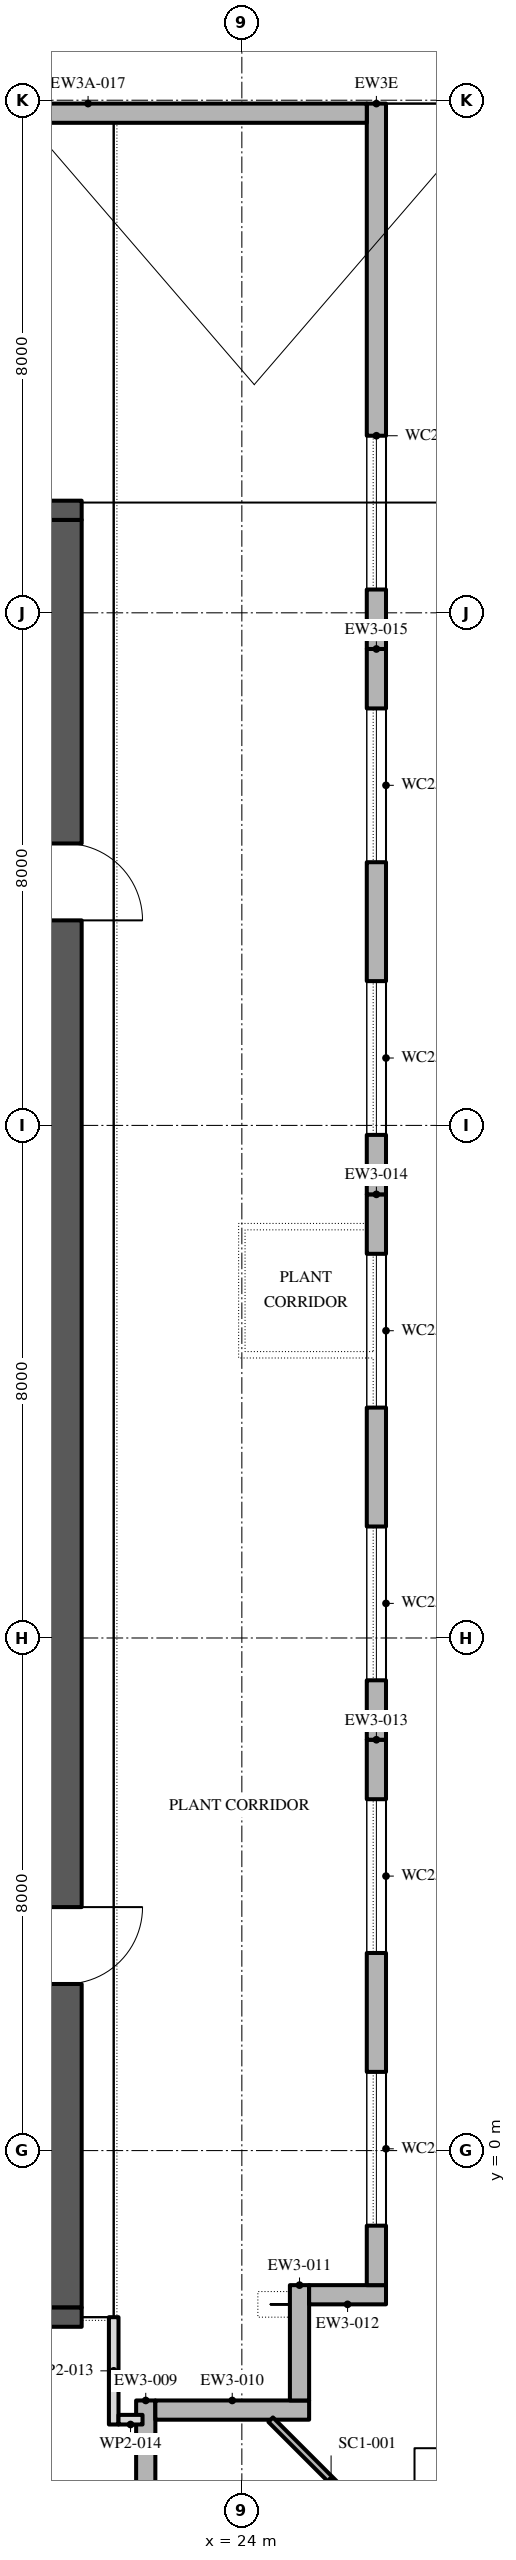
"""IFC4 building model, lengths in metres.
Left out: names, types, materials, properties, quantities, classifications, styles, units other than length and angle.
Written with IfcOpenShell. Run it as: python <this file> out.ifc"""

import sys

from ifc_helpers import new_model, si_unit, direction, frame, frame_2d, origin, place, context, subcontext, project, spatial, polyline, rectangle, outline, extrude, element, fill, save


model = new_model("IFC4")
c1 = context("Model", 3, precision=1e-05, world=origin(), true_north=direction((0.0, 1.0)))
c2 = subcontext(c1, "Body", "Model", "MODEL_VIEW")
j1 = project(units=[si_unit("LENGTHUNIT", "METRE"), si_unit("PLANEANGLEUNIT", "RADIAN")], contexts=[c1])
p1 = place(None, origin())
s1 = spatial("IfcSite", under=j1, at=p1, CompositionType="ELEMENT")
p2 = place(p1, origin())
s2 = spatial("IfcBuilding", under=s1, at=p2, CompositionType="ELEMENT")
p3 = place(p2, frame((0.0, 0.0, 385.8)))
s3 = spatial("IfcBuildingStorey", under=s2, at=p3, CompositionType="ELEMENT", Elevation=385.8)
p4 = place(p3, frame((22.5, -5.7, 0.0), z_axis=(0.0, 0.0, 1.0), x_axis=(0.0, 1.0, 0.0)))
e1 = element("IfcWall", 1, at=p4, inside=s3, PredefinedType="STANDARD", context=c2, shape_type="SweptSolid", body=[
    extrude(rectangle(XDim=1.8, YDim=0.3, at=frame_2d((0.9, 0.0))), origin(), (0.0, 0.0, 1.0), 4.0),
])
p5 = place(p3, frame((22.65, -4.05, 0.0), z_axis=(0.0, 0.0, 1.0), x_axis=(1.0, 0.0, 0.0)))
e2 = element("IfcWall", 2, at=p5, inside=s3, PredefinedType="STANDARD", context=c2, shape_type="SweptSolid", body=[
    extrude(rectangle(XDim=2.4, YDim=0.3, at=frame_2d((1.2, 0.0))), origin(), (0.0, 0.0, 1.0), 4.0),
])
p6 = place(p3, frame((24.9, -3.9, 0.0), z_axis=(0.0, 0.0, 1.0), x_axis=(0.0, 1.0, 0.0)))
e3 = element("IfcWall", 3, at=p6, inside=s3, PredefinedType="STANDARD", context=c2, shape_type="SweptSolid", body=[
    extrude(rectangle(XDim=1.8, YDim=0.3, at=frame_2d((0.9, 0.0))), origin(), (0.0, 0.0, 1.0), 4.0),
])
p7 = place(p3, frame((25.05, -2.25, 0.0), z_axis=(0.0, 0.0, 1.0), x_axis=(1.0, 0.0, 0.0)))
e4 = element("IfcWall", 4, at=p7, inside=s3, PredefinedType="STANDARD", context=c2, shape_type="SweptSolid", body=[
    extrude(rectangle(XDim=1.2, YDim=0.3, at=frame_2d((0.6, 0.0))), origin(), (0.0, 0.0, 1.0), 4.0),
])
p8 = place(p3, frame((26.1, -2.1, 0.0), z_axis=(0.0, 0.0, 1.0), x_axis=(0.0, 1.0, 0.0)))
e5 = element("IfcWall", 5, at=p8, inside=s3, PredefinedType="STANDARD", context=c2, shape_type="SweptSolid", body=[
    extrude(rectangle(XDim=8.512, YDim=0.3, at=frame_2d((4.256, 0.0))), origin(), (0.0, 0.0, 1.0), 4.0),
])
p9 = place(p8, frame((0.928, 0.0, 0.8)))
e6 = element("IfcOpeningElement", 6, at=p9, cuts=e5, PredefinedType="OPENING", context=c2, shape_type="SweptSolid", body=[
    extrude(outline(polyline([(0.0, 0.0), (2.4, 0.0), (2.4, 1.25), (2.377, 1.488), (2.31, 1.717), (2.2, 1.929), (2.051, 2.116), (1.87, 2.272), (1.663, 2.391), (1.437, 2.468), (1.2, 2.5), (0.963, 2.468), (0.737, 2.391), (0.53, 2.272), (0.349, 2.116), (0.2, 1.929), (0.09, 1.717), (0.023, 1.488), (0.0, 1.25), (0.0, 0.0)])), frame((0.0, 0.16, 0.0), z_axis=(0.0, -1.0, 0.0), x_axis=(1.0, 0.0, 0.0)), (0.0, 0.0, 1.0), 0.32),
])
p10 = place(p8, frame((5.184, 0.0, 0.8)))
e7 = element("IfcOpeningElement", 7, at=p10, cuts=e5, PredefinedType="OPENING", context=c2, shape_type="SweptSolid", body=[
    extrude(outline(polyline([(0.0, 0.0), (2.4, 0.0), (2.4, 1.25), (2.377, 1.488), (2.31, 1.717), (2.2, 1.929), (2.051, 2.116), (1.87, 2.272), (1.663, 2.391), (1.437, 2.468), (1.2, 2.5), (0.963, 2.468), (0.737, 2.391), (0.53, 2.272), (0.349, 2.116), (0.2, 1.929), (0.09, 1.717), (0.023, 1.488), (0.0, 1.25), (0.0, 0.0)])), frame((0.0, 0.16, 0.0), z_axis=(0.0, -1.0, 0.0), x_axis=(1.0, 0.0, 0.0)), (0.0, 0.0, 1.0), 0.32),
])
p11 = place(p3, frame((26.1, 6.412, 0.0), z_axis=(0.0, 0.0, 1.0), x_axis=(0.0, 1.0, 0.0)))
e8 = element("IfcWall", 8, at=p11, inside=s3, PredefinedType="STANDARD", context=c2, shape_type="SweptSolid", body=[
    extrude(rectangle(XDim=8.512, YDim=0.3, at=frame_2d((4.256, 0.0))), origin(), (0.0, 0.0, 1.0), 4.0),
])
p12 = place(p11, frame((0.928, 0.0, 0.8)))
e9 = element("IfcOpeningElement", 9, at=p12, cuts=e8, PredefinedType="OPENING", context=c2, shape_type="SweptSolid", body=[
    extrude(outline(polyline([(0.0, 0.0), (2.4, 0.0), (2.4, 1.25), (2.377, 1.488), (2.31, 1.717), (2.2, 1.929), (2.051, 2.116), (1.87, 2.272), (1.663, 2.391), (1.437, 2.468), (1.2, 2.5), (0.963, 2.468), (0.737, 2.391), (0.53, 2.272), (0.349, 2.116), (0.2, 1.929), (0.09, 1.717), (0.023, 1.488), (0.0, 1.25), (0.0, 0.0)])), frame((0.0, 0.16, 0.0), z_axis=(0.0, -1.0, 0.0), x_axis=(1.0, 0.0, 0.0)), (0.0, 0.0, 1.0), 0.32),
])
p13 = place(p11, frame((5.184, 0.0, 0.8)))
e10 = element("IfcOpeningElement", 10, at=p13, cuts=e8, PredefinedType="OPENING", context=c2, shape_type="SweptSolid", body=[
    extrude(outline(polyline([(0.0, 0.0), (2.4, 0.0), (2.4, 1.25), (2.377, 1.488), (2.31, 1.717), (2.2, 1.929), (2.051, 2.116), (1.87, 2.272), (1.663, 2.391), (1.437, 2.468), (1.2, 2.5), (0.963, 2.468), (0.737, 2.391), (0.53, 2.272), (0.349, 2.116), (0.2, 1.929), (0.09, 1.717), (0.023, 1.488), (0.0, 1.25), (0.0, 0.0)])), frame((0.0, 0.16, 0.0), z_axis=(0.0, -1.0, 0.0), x_axis=(1.0, 0.0, 0.0)), (0.0, 0.0, 1.0), 0.32),
])
p14 = place(p3, frame((26.1, 14.924, 0.0), z_axis=(0.0, 0.0, 1.0), x_axis=(0.0, 1.0, 0.0)))
e11 = element("IfcWall", 11, at=p14, inside=s3, PredefinedType="STANDARD", context=c2, shape_type="SweptSolid", body=[
    extrude(rectangle(XDim=8.512, YDim=0.3, at=frame_2d((4.256, 0.0))), origin(), (0.0, 0.0, 1.0), 4.0),
])
p15 = place(p14, frame((0.928, 0.0, 0.8)))
e12 = element("IfcOpeningElement", 12, at=p15, cuts=e11, PredefinedType="OPENING", context=c2, shape_type="SweptSolid", body=[
    extrude(outline(polyline([(0.0, 0.0), (2.4, 0.0), (2.4, 1.25), (2.377, 1.488), (2.31, 1.717), (2.2, 1.929), (2.051, 2.116), (1.87, 2.272), (1.663, 2.391), (1.437, 2.468), (1.2, 2.5), (0.963, 2.468), (0.737, 2.391), (0.53, 2.272), (0.349, 2.116), (0.2, 1.929), (0.09, 1.717), (0.023, 1.488), (0.0, 1.25), (0.0, 0.0)])), frame((0.0, 0.16, 0.0), z_axis=(0.0, -1.0, 0.0), x_axis=(1.0, 0.0, 0.0)), (0.0, 0.0, 1.0), 0.32),
])
p16 = place(p14, frame((5.184, 0.0, 0.8)))
e13 = element("IfcOpeningElement", 13, at=p16, cuts=e11, PredefinedType="OPENING", context=c2, shape_type="SweptSolid", body=[
    extrude(outline(polyline([(0.0, 0.0), (2.4, 0.0), (2.4, 1.25), (2.377, 1.488), (2.31, 1.717), (2.2, 1.929), (2.051, 2.116), (1.87, 2.272), (1.663, 2.391), (1.437, 2.468), (1.2, 2.5), (0.963, 2.468), (0.737, 2.391), (0.53, 2.272), (0.349, 2.116), (0.2, 1.929), (0.09, 1.717), (0.023, 1.488), (0.0, 1.25), (0.0, 0.0)])), frame((0.0, 0.16, 0.0), z_axis=(0.0, -1.0, 0.0), x_axis=(1.0, 0.0, 0.0)), (0.0, 0.0, 1.0), 0.32),
])
p17 = place(p3, frame((26.1, 23.436, 0.0), z_axis=(0.0, 0.0, 1.0), x_axis=(0.0, 1.0, 0.0)))
e14 = element("IfcWall", 14, at=p17, inside=s3, PredefinedType="STANDARD", context=c2, shape_type="SweptSolid", body=[
    extrude(outline(polyline([(0.0, 0.0), (8.512, 0.0), (8.512, 2.098), (5.693, 4.0), (2.305, 6.285), (2.285, 6.298), (2.285, 4.0), (0.0, 4.0), (0.0, 0.0)])), frame((0.0, 0.15, 0.0), z_axis=(0.0, -1.0, 0.0), x_axis=(1.0, 0.0, 0.0)), (0.0, 0.0, 1.0), 0.3),
])
p18 = place(p17, frame((0.928, 0.0, 0.8)))
e15 = element("IfcOpeningElement", 15, at=p18, cuts=e14, PredefinedType="OPENING", context=c2, shape_type="SweptSolid", body=[
    extrude(outline(polyline([(0.0, 0.0), (2.4, 0.0), (2.4, 0.85), (2.377, 1.088), (2.31, 1.317), (2.2, 1.529), (2.051, 1.717), (1.87, 1.872), (1.663, 1.991), (1.437, 2.068), (1.2, 2.1), (0.963, 2.068), (0.737, 1.991), (0.53, 1.872), (0.349, 1.717), (0.2, 1.529), (0.09, 1.317), (0.023, 1.088), (0.0, 0.85), (0.0, 0.0)])), frame((0.0, 0.16, 0.0), z_axis=(0.0, -1.0, 0.0), x_axis=(1.0, 0.0, 0.0)), (0.0, 0.0, 1.0), 0.32),
])
p19 = place(p3, frame((25.95, 31.798, 0.0), z_axis=(0.0, 0.0, 1.0), x_axis=(-1.0, 0.0, 0.0)))
e16 = element("IfcWall", 16, at=p19, inside=s3, PredefinedType="STANDARD", context=c2, shape_type="SweptSolid", body=[
    extrude(rectangle(XDim=8.7, YDim=0.3, at=frame_2d((4.35, 0.0))), origin(), (0.0, 0.0, 1.0), 2.199),
])
p20 = place(p3, frame((24.45, -4.2, -0.05), z_axis=(0.0, 0.0, 1.0), x_axis=(0.707106781187, -0.707106781187, 0.0)))
e17 = element("IfcWall", 17, at=p20, inside=s3, PredefinedType="STANDARD", context=c2, shape_type="SweptSolid", body=[
    extrude(rectangle(XDim=2.667, YDim=0.1, at=frame_2d((1.333, 0.0))), origin(), (0.0, 0.0, 1.0), 4.05),
])
p21 = place(p3, frame((21.25, -2.45, 0.0), z_axis=(0.0, 0.0, 1.0), x_axis=(0.0, 1.0, 0.0)))
e18 = element("IfcWall", 18, at=p21, inside=s3, PredefinedType="SHEAR", context=c2, shape_type="SweptSolid", body=[
    extrude(rectangle(XDim=27.9, YDim=0.5, at=frame_2d((13.95, 0.0))), origin(), (0.0, 0.0, 1.0), 4.0),
])
p22 = place(p21, frame((5.05, 0.0, 0.0)))
e19 = element("IfcOpeningElement", 19, at=p22, cuts=e18, PredefinedType="OPENING", context=c2, shape_type="SweptSolid", body=[
    extrude(rectangle(XDim=1.2, YDim=2.1, at=frame_2d((0.6, 1.05))), frame((0.0, 0.26, 0.0), z_axis=(0.0, -1.0, 0.0), x_axis=(1.0, 0.0, 0.0)), (0.0, 0.0, 1.0), 0.52),
])
p23 = place(p21, frame((21.65, 0.0, 0.0)))
e20 = element("IfcOpeningElement", 20, at=p23, cuts=e18, PredefinedType="OPENING", context=c2, shape_type="SweptSolid", body=[
    extrude(rectangle(XDim=1.2, YDim=2.1, at=frame_2d((0.6, 1.05))), frame((0.0, 0.26, 0.0), z_axis=(0.0, -1.0, 0.0), x_axis=(1.0, 0.0, 0.0)), (0.0, 0.0, 1.0), 0.52),
])
for number, where, z_axis, x_axis in (
    (21, (10.5, -2.6, 0.0), (0.0, 0.0, 1.0), (1.0, 0.0, 0.0)),
    (22, (10.5, 25.6, 0.0), (0.0, 0.0, 1.0), (1.0, 0.0, 0.0)),
):
    element("IfcWall", number, at=place(p3, frame(where, z_axis=z_axis, x_axis=x_axis)), inside=s3, PredefinedType="SHEAR", context=c2, shape_type="SweptSolid", body=[
        extrude(rectangle(XDim=11.0, YDim=0.3, at=frame_2d((5.5, 0.0))), origin(), (0.0, 0.0, 1.0), 4.0),
    ])
p24 = place(p3, frame((22.0, -4.275, 0.0), z_axis=(0.0, 0.0, 1.0), x_axis=(0.0, 1.0, 0.0)))
e23 = element("IfcWall", 23, at=p24, inside=s3, PredefinedType="PARTITIONING", context=c2, shape_type="SweptSolid", body=[
    extrude(rectangle(XDim=1.675, YDim=0.15, at=frame_2d((0.837, 0.0))), origin(), (0.0, 0.0, 1.0), 4.0),
])
p25 = place(p3, frame((22.45, -4.2, 0.0), z_axis=(0.0, 0.0, 1.0), x_axis=(-1.0, 0.0, 0.0)))
e24 = element("IfcWall", 24, at=p25, inside=s3, PredefinedType="PARTITIONING", context=c2, shape_type="SweptSolid", body=[
    extrude(rectangle(XDim=0.375, YDim=0.15, at=frame_2d((0.188, 0.0))), origin(), (0.0, 0.0, 1.0), 4.0),
])
p26 = place(p9, origin())
e25 = element("IfcWindow", 25, at=p26, inside=s3, PartitioningType="DOUBLE_PANEL_VERTICAL", PredefinedType="WINDOW", context=c2, shape_type="SweptSolid", body=[
    extrude(outline(polyline([(0.0, 0.0), (2.4, 0.0), (2.4, 1.25), (2.377, 1.488), (2.31, 1.717), (2.2, 1.929), (2.051, 2.116), (1.87, 2.272), (1.663, 2.391), (1.437, 2.468), (1.2, 2.5), (0.963, 2.468), (0.737, 2.391), (0.53, 2.272), (0.349, 2.116), (0.2, 1.929), (0.09, 1.717), (0.023, 1.488), (0.0, 1.25), (0.0, 0.0)])), frame((0.0, 0.03, 0.0), z_axis=(0.0, -1.0, 0.0), x_axis=(1.0, 0.0, 0.0)), (0.0, 0.0, 1.0), 0.06),
])
fill(e6, e25)
p27 = place(p10, origin())
e26 = element("IfcWindow", 26, at=p27, inside=s3, PartitioningType="DOUBLE_PANEL_VERTICAL", PredefinedType="WINDOW", context=c2, shape_type="SweptSolid", body=[
    extrude(outline(polyline([(0.0, 0.0), (2.4, 0.0), (2.4, 1.25), (2.377, 1.488), (2.31, 1.717), (2.2, 1.929), (2.051, 2.116), (1.87, 2.272), (1.663, 2.391), (1.437, 2.468), (1.2, 2.5), (0.963, 2.468), (0.737, 2.391), (0.53, 2.272), (0.349, 2.116), (0.2, 1.929), (0.09, 1.717), (0.023, 1.488), (0.0, 1.25), (0.0, 0.0)])), frame((0.0, 0.03, 0.0), z_axis=(0.0, -1.0, 0.0), x_axis=(1.0, 0.0, 0.0)), (0.0, 0.0, 1.0), 0.06),
])
fill(e7, e26)
p28 = place(p12, origin())
e27 = element("IfcWindow", 27, at=p28, inside=s3, PartitioningType="DOUBLE_PANEL_VERTICAL", PredefinedType="WINDOW", context=c2, shape_type="SweptSolid", body=[
    extrude(outline(polyline([(0.0, 0.0), (2.4, 0.0), (2.4, 1.25), (2.377, 1.488), (2.31, 1.717), (2.2, 1.929), (2.051, 2.116), (1.87, 2.272), (1.663, 2.391), (1.437, 2.468), (1.2, 2.5), (0.963, 2.468), (0.737, 2.391), (0.53, 2.272), (0.349, 2.116), (0.2, 1.929), (0.09, 1.717), (0.023, 1.488), (0.0, 1.25), (0.0, 0.0)])), frame((0.0, 0.03, 0.0), z_axis=(0.0, -1.0, 0.0), x_axis=(1.0, 0.0, 0.0)), (0.0, 0.0, 1.0), 0.06),
])
fill(e9, e27)
p29 = place(p13, origin())
e28 = element("IfcWindow", 28, at=p29, inside=s3, PartitioningType="DOUBLE_PANEL_VERTICAL", PredefinedType="WINDOW", context=c2, shape_type="SweptSolid", body=[
    extrude(outline(polyline([(0.0, 0.0), (2.4, 0.0), (2.4, 1.25), (2.377, 1.488), (2.31, 1.717), (2.2, 1.929), (2.051, 2.116), (1.87, 2.272), (1.663, 2.391), (1.437, 2.468), (1.2, 2.5), (0.963, 2.468), (0.737, 2.391), (0.53, 2.272), (0.349, 2.116), (0.2, 1.929), (0.09, 1.717), (0.023, 1.488), (0.0, 1.25), (0.0, 0.0)])), frame((0.0, 0.03, 0.0), z_axis=(0.0, -1.0, 0.0), x_axis=(1.0, 0.0, 0.0)), (0.0, 0.0, 1.0), 0.06),
])
fill(e10, e28)
p30 = place(p15, origin())
e29 = element("IfcWindow", 29, at=p30, inside=s3, PartitioningType="DOUBLE_PANEL_VERTICAL", PredefinedType="WINDOW", context=c2, shape_type="SweptSolid", body=[
    extrude(outline(polyline([(0.0, 0.0), (2.4, 0.0), (2.4, 1.25), (2.377, 1.488), (2.31, 1.717), (2.2, 1.929), (2.051, 2.116), (1.87, 2.272), (1.663, 2.391), (1.437, 2.468), (1.2, 2.5), (0.963, 2.468), (0.737, 2.391), (0.53, 2.272), (0.349, 2.116), (0.2, 1.929), (0.09, 1.717), (0.023, 1.488), (0.0, 1.25), (0.0, 0.0)])), frame((0.0, 0.03, 0.0), z_axis=(0.0, -1.0, 0.0), x_axis=(1.0, 0.0, 0.0)), (0.0, 0.0, 1.0), 0.06),
])
fill(e12, e29)
p31 = place(p16, origin())
e30 = element("IfcWindow", 30, at=p31, inside=s3, PartitioningType="DOUBLE_PANEL_VERTICAL", PredefinedType="WINDOW", context=c2, shape_type="SweptSolid", body=[
    extrude(outline(polyline([(0.0, 0.0), (2.4, 0.0), (2.4, 1.25), (2.377, 1.488), (2.31, 1.717), (2.2, 1.929), (2.051, 2.116), (1.87, 2.272), (1.663, 2.391), (1.437, 2.468), (1.2, 2.5), (0.963, 2.468), (0.737, 2.391), (0.53, 2.272), (0.349, 2.116), (0.2, 1.929), (0.09, 1.717), (0.023, 1.488), (0.0, 1.25), (0.0, 0.0)])), frame((0.0, 0.03, 0.0), z_axis=(0.0, -1.0, 0.0), x_axis=(1.0, 0.0, 0.0)), (0.0, 0.0, 1.0), 0.06),
])
fill(e13, e30)
p32 = place(p18, origin())
e31 = element("IfcWindow", 31, at=p32, inside=s3, PartitioningType="DOUBLE_PANEL_VERTICAL", PredefinedType="WINDOW", context=c2, shape_type="SweptSolid", body=[
    extrude(outline(polyline([(0.0, 0.0), (2.4, 0.0), (2.4, 0.85), (2.377, 1.088), (2.31, 1.317), (2.2, 1.529), (2.051, 1.717), (1.87, 1.872), (1.663, 1.991), (1.437, 2.068), (1.2, 2.1), (0.963, 2.068), (0.737, 1.991), (0.53, 1.872), (0.349, 1.717), (0.2, 1.529), (0.09, 1.317), (0.023, 1.088), (0.0, 0.85), (0.0, 0.0)])), frame((0.0, 0.03, 0.0), z_axis=(0.0, -1.0, 0.0), x_axis=(1.0, 0.0, 0.0)), (0.0, 0.0, 1.0), 0.06),
])
fill(e15, e31)
p33 = place(p22, frame((1.2, 0.0, 0.0), z_axis=(0.0, 0.0, 1.0), x_axis=(-1.0, 0.0, 0.0)))
e32 = element("IfcDoor", 32, at=p33, inside=s3, OperationType="SINGLE_SWING_RIGHT", PredefinedType="DOOR", context=c2, shape_type="SweptSolid", body=[
    extrude(rectangle(XDim=1.2, YDim=2.1, at=frame_2d((0.6, 1.05))), frame((0.0, 0.025, 0.0), z_axis=(0.0, -1.0, 0.0), x_axis=(1.0, 0.0, 0.0)), (0.0, 0.0, 1.0), 0.05),
])
fill(e19, e32)
p34 = place(p23, frame((1.2, 0.0, 0.0), z_axis=(0.0, 0.0, 1.0), x_axis=(-1.0, 0.0, 0.0)))
e33 = element("IfcDoor", 33, at=p34, inside=s3, OperationType="SINGLE_SWING_LEFT", PredefinedType="DOOR", context=c2, shape_type="SweptSolid", body=[
    extrude(rectangle(XDim=1.2, YDim=2.1, at=frame_2d((0.6, 1.05))), frame((0.0, 0.025, 0.0), z_axis=(0.0, -1.0, 0.0), x_axis=(1.0, 0.0, 0.0)), (0.0, 0.0, 1.0), 0.05),
])
fill(e20, e33)
save(model, sys.argv[1])
